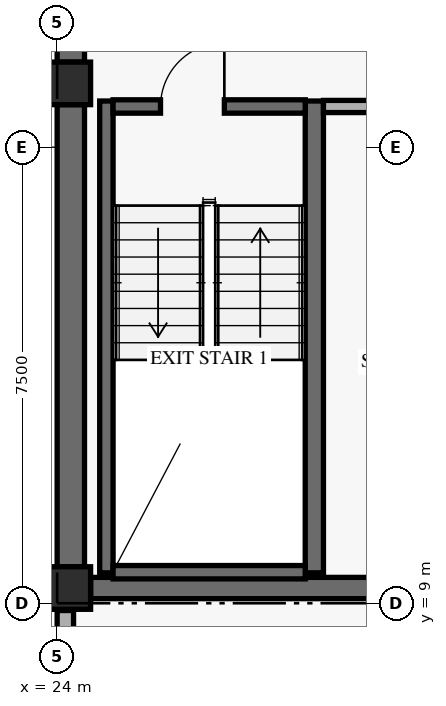
"""IFC4 building model, lengths in metres.
Left out: names, types, materials, properties, quantities, classifications, styles, units other than length and angle.
Written with IfcOpenShell. Run it as: python <this file> out.ifc"""

import sys

from ifc_helpers import new_model, si_unit, direction, frame, frame_2d, origin, origin_2d, place, context, subcontext, project, spatial, rectangle, extrude, element, fill, save


model = new_model("IFC4")
c1 = context("Model", 3, precision=1e-05, world=origin(), true_north=direction((0.0, 1.0)))
c2 = subcontext(c1, "Body", "Model", "MODEL_VIEW")
j1 = project(units=[si_unit("LENGTHUNIT", "METRE"), si_unit("PLANEANGLEUNIT", "RADIAN")], contexts=[c1])
p1 = place(None, origin())
s1 = spatial("IfcSite", under=j1, at=p1, CompositionType="ELEMENT")
p2 = place(p1, origin())
s2 = spatial("IfcBuilding", under=s1, at=p2, CompositionType="ELEMENT")
p3 = place(p2, frame((0.0, 0.0, 242.4)))
s3 = spatial("IfcBuildingStorey", under=s2, at=p3, CompositionType="ELEMENT", Elevation=242.4)
p4 = place(p3, frame((24.225, 9.6, 0.0), z_axis=(0.0, 0.0, 1.0), x_axis=(0.0, 1.0, 0.0)))
e1 = element("IfcWall", 1, at=p4, inside=s3, PredefinedType="SHEAR", context=c2, shape_type="SweptSolid", body=[
    extrude(rectangle(XDim=7.6, YDim=0.45, at=frame_2d((3.8, 0.0))), origin(), (0.0, 0.0, 1.0), 2.821),
])
p5 = place(p3, frame((24.225, 17.9, 0.0), z_axis=(0.0, 0.0, 1.0), x_axis=(0.0, 1.0, 0.0)))
e2 = element("IfcWall", 2, at=p5, inside=s3, PredefinedType="SHEAR", context=c2, shape_type="SweptSolid", body=[
    extrude(rectangle(XDim=11.95, YDim=0.45, at=frame_2d((5.975, 0.0))), origin(), (0.0, 0.0, 1.0), 2.821),
])
p6 = place(p3, frame((24.55, 9.25, 0.0), z_axis=(0.0, 0.0, 1.0), x_axis=(1.0, 0.0, 0.0)))
e3 = element("IfcWall", 3, at=p6, inside=s3, PredefinedType="SHEAR", context=c2, shape_type="SweptSolid", body=[
    extrude(rectangle(XDim=10.3, YDim=0.35, at=frame_2d((5.15, 0.0))), origin(), (0.0, 0.0, 1.0), 3.36),
])
p7 = place(p6, frame((5.2, 0.0, 0.0)))
e4 = element("IfcOpeningElement", 4, at=p7, cuts=e3, PredefinedType="OPENING", context=c2, shape_type="SweptSolid", body=[
    extrude(rectangle(XDim=0.95, YDim=2.15, at=frame_2d((0.475, 1.075))), frame((0.0, 0.185, 0.0), z_axis=(0.0, -1.0, 0.0), x_axis=(1.0, 0.0, 0.0)), (0.0, 0.0, 1.0), 0.37),
])
p8 = place(p3, frame((24.81, 9.5, 0.0), z_axis=(0.0, 0.0, 1.0), x_axis=(0.0, 1.0, 0.0)))
e5 = element("IfcWall", 5, at=p8, inside=s3, PredefinedType="SHEAR", context=c2, shape_type="SweptSolid", body=[
    extrude(rectangle(XDim=7.76, YDim=0.22, at=frame_2d((3.88, 0.0))), origin(), (0.0, 0.0, 1.0), 3.36),
])
p9 = place(p3, frame((28.23, 9.5, 0.0), z_axis=(0.0, 0.0, 1.0), x_axis=(0.0, 1.0, 0.0)))
e6 = element("IfcWall", 6, at=p9, inside=s3, PredefinedType="SHEAR", context=c2, shape_type="SweptSolid", body=[
    extrude(rectangle(XDim=7.76, YDim=0.3, at=frame_2d((3.88, 0.0))), origin(), (0.0, 0.0, 1.0), 3.36),
])
p10 = place(p3, frame((24.92, 9.51, 0.0), z_axis=(0.0, 0.0, 1.0), x_axis=(1.0, 0.0, 0.0)))
e7 = element("IfcWall", 7, at=p10, inside=s3, PredefinedType="SHEAR", context=c2, shape_type="SweptSolid", body=[
    extrude(rectangle(XDim=3.16, YDim=0.22, at=frame_2d((1.58, 0.0))), origin(), (0.0, 0.0, 1.0), 3.36),
])
p11 = place(p3, frame((24.92, 17.17, 0.0), z_axis=(0.0, 0.0, 1.0), x_axis=(1.0, 0.0, 0.0)))
e8 = element("IfcWall", 8, at=p11, inside=s3, PredefinedType="SHEAR", context=c2, shape_type="SweptSolid", body=[
    extrude(rectangle(XDim=3.16, YDim=0.22, at=frame_2d((1.58, 0.0))), origin(), (0.0, 0.0, 1.0), 3.36),
])
p12 = place(p11, frame((0.78, 0.0, 0.0)))
e9 = element("IfcOpeningElement", 9, at=p12, cuts=e8, PredefinedType="OPENING", context=c2, shape_type="SweptSolid", body=[
    extrude(rectangle(XDim=1.05, YDim=2.15, at=frame_2d((0.525, 1.075))), frame((0.0, 0.12, 0.0), z_axis=(0.0, -1.0, 0.0), x_axis=(1.0, 0.0, 0.0)), (0.0, 0.0, 1.0), 0.24),
])
for number, where, z_axis, x_axis in (
    (10, (24.2, 9.25, 0.0), (0.0, 0.0, 1.0), (1.0, 0.0, 0.0)),
    (11, (24.2, 17.55, 0.0), (0.0, 0.0, 1.0), (1.0, 0.0, 0.0)),
):
    element("IfcColumn", number, at=place(p3, frame(where, z_axis=z_axis, x_axis=x_axis)), inside=s3, PredefinedType="COLUMN", context=c2, shape_type="SweptSolid", body=[
        extrude(rectangle(XDim=0.7, YDim=0.7, at=origin_2d()), origin(), (0.0, 0.0, 1.0), 3.6),
    ])
p13 = place(p3, frame((24.135, 7.32, 0.0), z_axis=(0.0, 0.0, 1.0), x_axis=(0.0, 1.0, 0.0)))
e12 = element("IfcWall", 12, at=p13, inside=s3, PredefinedType="SOLIDWALL", context=c2, shape_type="SweptSolid", body=[
    extrude(rectangle(XDim=1.56, YDim=0.27, at=frame_2d((0.78, 0.0))), origin(), (0.0, 0.0, 1.0), 2.803),
])
p14 = place(p13, frame((0.305, 0.0, 0.85)))
e13 = element("IfcOpeningElement", 13, at=p14, cuts=e12, PredefinedType="OPENING", context=c2, shape_type="SweptSolid", body=[
    extrude(rectangle(XDim=0.95, YDim=1.5, at=frame_2d((0.475, 0.75))), frame((0.0, 0.145, 0.0), z_axis=(0.0, -1.0, 0.0), x_axis=(1.0, 0.0, 0.0)), (0.0, 0.0, 1.0), 0.29),
])
p15 = place(p3, frame((28.38, 17.17, 0.0), z_axis=(0.0, 0.0, 1.0), x_axis=(1.0, 0.0, 0.0)))
e14 = element("IfcWall", 14, at=p15, inside=s3, PredefinedType="STANDARD", context=c2, shape_type="SweptSolid", body=[
    extrude(rectangle(XDim=2.9, YDim=0.2, at=frame_2d((1.45, 0.0))), origin(), (0.0, 0.0, 1.0), 3.36),
])
p16 = place(p12, frame((1.05, 0.0, 0.0), z_axis=(0.0, 0.0, 1.0), x_axis=(-1.0, 0.0, 0.0)))
e15 = element("IfcDoor", 15, at=p16, inside=s3, OperationType="SINGLE_SWING_LEFT", PredefinedType="DOOR", context=c2, shape_type="SweptSolid", body=[
    extrude(rectangle(XDim=1.05, YDim=2.15, at=frame_2d((0.525, 1.075))), frame((0.0, 0.025, 0.0), z_axis=(0.0, -1.0, 0.0), x_axis=(1.0, 0.0, 0.0)), (0.0, 0.0, 1.0), 0.05),
])
fill(e9, e15)
save(model, sys.argv[1])
